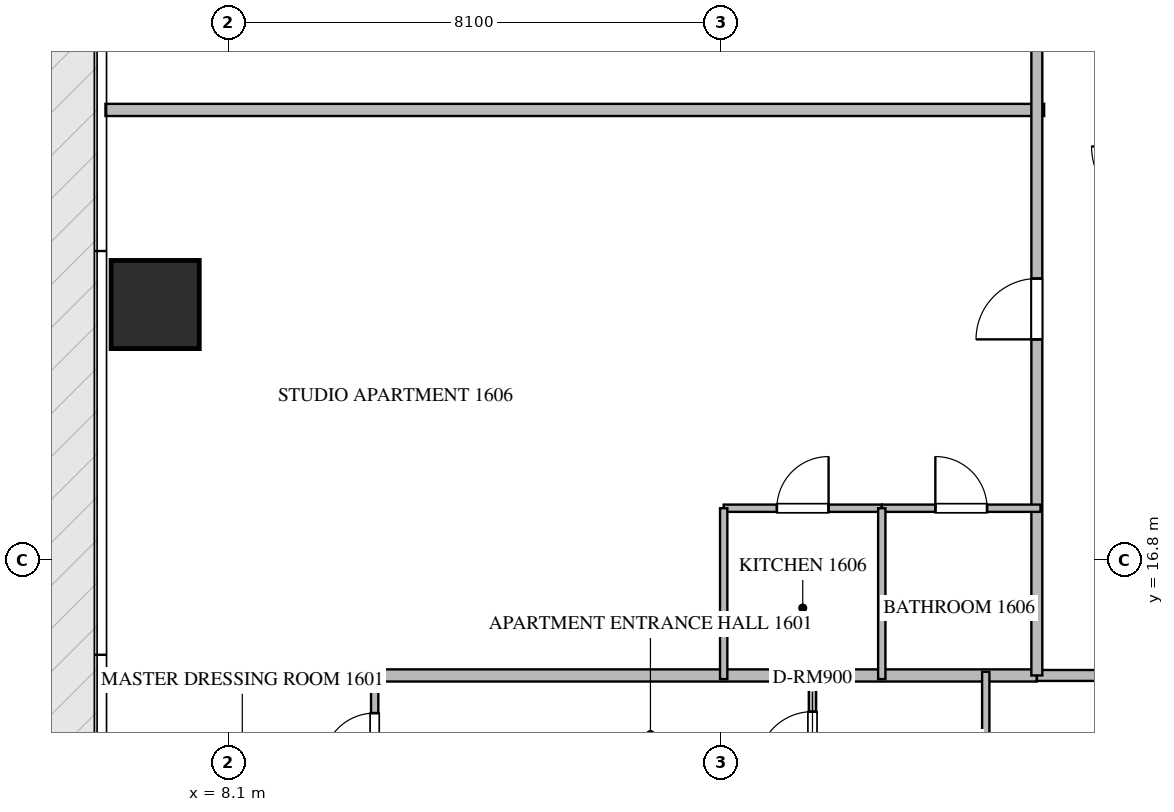
"""IFC4 building model, lengths in metres.
Left out: names, types, materials, properties, quantities, classifications, styles, units other than length and angle.
Written with IfcOpenShell. Run it as: python <this file> out.ifc"""

import sys

from ifc_helpers import new_model, si_unit, direction, frame, frame_2d, origin, origin_2d, place, context, subcontext, project, spatial, rectangle, extrude, source, transform, mapped, element, fill, save


model = new_model("IFC4")
c1 = context("Model", 3, precision=1e-05, world=origin(), true_north=direction((0.0, 1.0)))
c2 = subcontext(c1, "Body", "Model", "MODEL_VIEW")
j1 = project(units=[si_unit("LENGTHUNIT", "METRE"), si_unit("PLANEANGLEUNIT", "RADIAN")], contexts=[c1])
p1 = place(None, origin())
s1 = spatial("IfcSite", under=j1, at=p1, CompositionType="ELEMENT")
p2 = place(p1, origin())
s2 = spatial("IfcBuilding", under=s1, at=p2, CompositionType="ELEMENT")
p3 = place(p2, frame((0.0, 0.0, 67.95)))
s3 = spatial("IfcBuildingStorey", under=s2, at=p3, CompositionType="ELEMENT", Elevation=67.95)
m1 = source(origin(), c2, "Body", "SweptSolid", [
    extrude(rectangle(XDim=1.45, YDim=1.45, at=origin_2d()), origin(), (0.0, 0.0, 1.0), 3.75),
])
p4 = place(p3, frame((6.9, 21.0, -0.26), z_axis=(0.0, 0.0, 1.0), x_axis=(1.0, 0.0, 0.0)))
e1 = element("IfcColumn", 1, at=p4, inside=s3, PredefinedType="COLUMN", context=c2, shape_type="MappedRepresentation", body=[
    mapped(m1, transform((0.0, 0.0, 0.0), scale=1.0)),
])
p5 = place(p3, frame((6.082, 24.2, 0.0), z_axis=(0.0, 0.0, 1.0), x_axis=(1.0, 0.0, 0.0)))
e2 = element("IfcWall", 2, at=p5, inside=s3, PredefinedType="PARTITIONING", context=c2, shape_type="SweptSolid", body=[
    extrude(rectangle(XDim=15.438, YDim=0.2, at=frame_2d((7.719, 0.0))), origin(), (0.0, 0.0, 1.0), 3.49),
])
p6 = place(p3, frame((6.082, 14.9, 0.0), z_axis=(0.0, 0.0, 1.0), x_axis=(1.0, 0.0, 0.0)))
e3 = element("IfcWall", 3, at=p6, inside=s3, PredefinedType="PARTITIONING", context=c2, shape_type="SweptSolid", body=[
    extrude(rectangle(XDim=15.318, YDim=0.2, at=frame_2d((7.659, 0.0))), origin(), (0.0, 0.0, 1.0), 3.49),
])
p7 = place(p3, frame((21.402, 14.9, 0.0), z_axis=(0.0, 0.0, 1.0), x_axis=(1.0, 0.0, 0.0)))
e4 = element("IfcWall", 4, at=p7, inside=s3, PredefinedType="PARTITIONING", context=c2, shape_type="SweptSolid", body=[
    extrude(rectangle(XDim=21.996, YDim=0.18, at=frame_2d((10.998, 0.0))), origin(), (0.0, 0.0, 1.0), 3.49),
])
p8 = place(p7, frame((1.96, 0.0, 0.0)))
e5 = element("IfcOpeningElement", 5, at=p8, cuts=e4, PredefinedType="OPENING", context=c2, shape_type="SweptSolid", body=[
    extrude(rectangle(XDim=1.0, YDim=2.15, at=frame_2d((0.5, 1.075))), frame((0.0, 0.1, 0.0), z_axis=(0.0, -1.0, 0.0), x_axis=(1.0, 0.0, 0.0)), (0.0, 0.0, 1.0), 0.2),
])
p9 = place(p7, frame((5.249, 0.0, 0.0)))
e6 = element("IfcOpeningElement", 6, at=p9, cuts=e4, PredefinedType="OPENING", context=c2, shape_type="SweptSolid", body=[
    extrude(rectangle(XDim=1.0, YDim=2.15, at=frame_2d((0.5, 1.075))), frame((0.0, 0.1, 0.0), z_axis=(0.0, -1.0, 0.0), x_axis=(1.0, 0.0, 0.0)), (0.0, 0.0, 1.0), 0.2),
])
p10 = place(p7, frame((11.653, 0.0, 0.0)))
e7 = element("IfcOpeningElement", 7, at=p10, cuts=e4, PredefinedType="OPENING", context=c2, shape_type="SweptSolid", body=[
    extrude(rectangle(XDim=1.0, YDim=2.15, at=frame_2d((0.5, 1.075))), frame((0.0, 0.1, 0.0), z_axis=(0.0, -1.0, 0.0), x_axis=(1.0, 0.0, 0.0)), (0.0, 0.0, 1.0), 0.2),
])
p11 = place(p7, frame((18.896, 0.0, 0.0)))
e8 = element("IfcOpeningElement", 8, at=p11, cuts=e4, PredefinedType="OPENING", context=c2, shape_type="SweptSolid", body=[
    extrude(rectangle(XDim=1.0, YDim=2.15, at=frame_2d((0.5, 1.075))), frame((0.0, 0.1, 0.0), z_axis=(0.0, -1.0, 0.0), x_axis=(1.0, 0.0, 0.0)), (0.0, 0.0, 1.0), 0.2),
])
p12 = place(p3, frame((21.4, 14.9, 0.0), z_axis=(0.0, 0.0, 1.0), x_axis=(0.0, 1.0, 0.0)))
e9 = element("IfcWall", 9, at=p12, inside=s3, PredefinedType="PARTITIONING", context=c2, shape_type="SweptSolid", body=[
    extrude(rectangle(XDim=20.6, YDim=0.18, at=frame_2d((10.3, 0.0))), origin(), (0.0, 0.0, 1.0), 3.49),
])
p13 = place(p12, frame((5.527, 0.0, 0.0)))
e10 = element("IfcOpeningElement", 10, at=p13, cuts=e9, PredefinedType="OPENING", context=c2, shape_type="SweptSolid", body=[
    extrude(rectangle(XDim=1.0, YDim=2.15, at=frame_2d((0.5, 1.075))), frame((0.0, 0.1, 0.0), z_axis=(0.0, -1.0, 0.0), x_axis=(1.0, 0.0, 0.0)), (0.0, 0.0, 1.0), 0.2),
])
p14 = place(p12, frame((10.604, 0.0, 0.0)))
e11 = element("IfcOpeningElement", 11, at=p14, cuts=e9, PredefinedType="OPENING", context=c2, shape_type="SweptSolid", body=[
    extrude(rectangle(XDim=1.0, YDim=2.15, at=frame_2d((0.5, 1.075))), frame((0.0, 0.1, 0.0), z_axis=(0.0, -1.0, 0.0), x_axis=(1.0, 0.0, 0.0)), (0.0, 0.0, 1.0), 0.2),
])
p15 = place(p3, frame((20.56, 12.15, 0.0), z_axis=(0.0, 0.0, 1.0), x_axis=(0.0, 1.0, 0.0)))
e12 = element("IfcWall", 12, at=p15, inside=s3, PredefinedType="PARTITIONING", context=c2, shape_type="SweptSolid", body=[
    extrude(rectangle(XDim=2.81, YDim=0.12, at=frame_2d((1.405, 0.0))), origin(), (0.0, 0.0, 1.0), 3.49),
])
p16 = place(p3, frame((17.71, 12.75, 0.0), z_axis=(0.0, 0.0, 1.0), x_axis=(0.0, 1.0, 0.0)))
e13 = element("IfcWall", 13, at=p16, inside=s3, PredefinedType="PARTITIONING", context=c2, shape_type="SweptSolid", body=[
    extrude(rectangle(XDim=2.21, YDim=0.12, at=frame_2d((1.105, 0.0))), origin(), (0.0, 0.0, 1.0), 3.49),
])
p17 = place(p16, frame((0.655, 0.0, 0.0)))
e14 = element("IfcOpeningElement", 14, at=p17, cuts=e13, PredefinedType="OPENING", context=c2, shape_type="SweptSolid", body=[
    extrude(rectangle(XDim=0.9, YDim=2.1, at=frame_2d((0.45, 1.05))), frame((0.0, 0.07, 0.0), z_axis=(0.0, -1.0, 0.0), x_axis=(1.0, 0.0, 0.0)), (0.0, 0.0, 1.0), 0.14),
])
p18 = place(p3, frame((10.51, 12.752, 0.0), z_axis=(0.0, 0.0, 1.0), x_axis=(0.0, 1.0, 0.0)))
e15 = element("IfcWall", 15, at=p18, inside=s3, PredefinedType="PARTITIONING", context=c2, shape_type="SweptSolid", body=[
    extrude(rectangle(XDim=2.208, YDim=0.12, at=frame_2d((1.104, 0.0))), origin(), (0.0, 0.0, 1.0), 3.49),
])
p19 = place(p18, frame((0.679, 0.0, 0.0)))
e16 = element("IfcOpeningElement", 16, at=p19, cuts=e15, PredefinedType="OPENING", context=c2, shape_type="SweptSolid", body=[
    extrude(rectangle(XDim=0.85, YDim=2.1, at=frame_2d((0.425, 1.05))), frame((0.0, 0.07, 0.0), z_axis=(0.0, -1.0, 0.0), x_axis=(1.0, 0.0, 0.0)), (0.0, 0.0, 1.0), 0.14),
])
p20 = place(p3, frame((16.25, 17.65, 0.0), z_axis=(0.0, 0.0, 1.0), x_axis=(1.0, 0.0, 0.0)))
e17 = element("IfcWall", 17, at=p20, inside=s3, PredefinedType="PARTITIONING", context=c2, shape_type="SweptSolid", body=[
    extrude(rectangle(XDim=2.6, YDim=0.12, at=frame_2d((1.3, 0.0))), origin(), (0.0, 0.0, 1.0), 3.49),
])
p21 = place(p20, frame((0.875, 0.0, 0.0)))
e18 = element("IfcOpeningElement", 18, at=p21, cuts=e17, PredefinedType="OPENING", context=c2, shape_type="SweptSolid", body=[
    extrude(rectangle(XDim=0.85, YDim=2.1, at=frame_2d((0.425, 1.05))), frame((0.0, 0.07, 0.0), z_axis=(0.0, -1.0, 0.0), x_axis=(1.0, 0.0, 0.0)), (0.0, 0.0, 1.0), 0.14),
])
p22 = place(p3, frame((18.852, 17.65, 0.0), z_axis=(0.0, 0.0, 1.0), x_axis=(1.0, 0.0, 0.0)))
e19 = element("IfcWall", 19, at=p22, inside=s3, PredefinedType="PARTITIONING", context=c2, shape_type="SweptSolid", body=[
    extrude(rectangle(XDim=2.608, YDim=0.12, at=frame_2d((1.304, 0.0))), origin(), (0.0, 0.0, 1.0), 3.49),
])
p23 = place(p22, frame((0.879, 0.0, 0.0)))
e20 = element("IfcOpeningElement", 20, at=p23, cuts=e19, PredefinedType="OPENING", context=c2, shape_type="SweptSolid", body=[
    extrude(rectangle(XDim=0.85, YDim=2.1, at=frame_2d((0.425, 1.05))), frame((0.0, 0.07, 0.0), z_axis=(0.0, -1.0, 0.0), x_axis=(1.0, 0.0, 0.0)), (0.0, 0.0, 1.0), 0.14),
])
for number, where, z_axis, x_axis in (
    (21, (18.85, 14.84, 0.0), (0.0, 0.0, 1.0), (0.0, 1.0, 0.0)),
    (22, (16.25, 14.84, 0.0), (0.0, 0.0, 1.0), (0.0, 1.0, 0.0)),
):
    element("IfcWall", number, at=place(p3, frame(where, z_axis=z_axis, x_axis=x_axis)), inside=s3, PredefinedType="PARTITIONING", context=c2, shape_type="SweptSolid", body=[
        extrude(rectangle(XDim=2.81, YDim=0.12, at=frame_2d((1.405, 0.0))), origin(), (0.0, 0.0, 1.0), 3.49),
    ])
m2 = source(origin(), c2, "Body", "SweptSolid", [
    extrude(rectangle(XDim=1.0, YDim=2.15, at=frame_2d((0.5, 1.075))), frame((0.0, 0.025, 0.0), z_axis=(0.0, -1.0, 0.0), x_axis=(1.0, 0.0, 0.0)), (0.0, 0.0, 1.0), 0.05),
])
p24 = place(p13, origin())
e23 = element("IfcDoor", 23, at=p24, inside=s3, OperationType="SINGLE_SWING_LEFT", PredefinedType="DOOR", context=c2, shape_type="MappedRepresentation", body=[
    mapped(m2, transform((0.0, 0.0, 0.0), scale=1.0)),
])
fill(e10, e23)
m3 = source(origin(), c2, "Body", "SweptSolid", [
    extrude(rectangle(XDim=0.9, YDim=2.1, at=frame_2d((0.45, 1.05))), frame((0.0, 0.025, 0.0), z_axis=(0.0, -1.0, 0.0), x_axis=(1.0, 0.0, 0.0)), (0.0, 0.0, 1.0), 0.05),
])
p25 = place(p17, origin())
e24 = element("IfcDoor", 24, at=p25, inside=s3, OperationType="SINGLE_SWING_LEFT", PredefinedType="DOOR", context=c2, shape_type="MappedRepresentation", body=[
    mapped(m3, transform((0.0, 0.0, 0.0), scale=1.0)),
])
fill(e14, e24)
m4 = source(origin(), c2, "Body", "SweptSolid", [
    extrude(rectangle(XDim=0.85, YDim=2.1, at=frame_2d((0.425, 1.05))), frame((0.0, 0.025, 0.0), z_axis=(0.0, -1.0, 0.0), x_axis=(1.0, 0.0, 0.0)), (0.0, 0.0, 1.0), 0.05),
])
p26 = place(p19, origin())
e25 = element("IfcDoor", 25, at=p26, inside=s3, OperationType="SINGLE_SWING_LEFT", PredefinedType="DOOR", context=c2, shape_type="MappedRepresentation", body=[
    mapped(m4, transform((0.0, 0.0, 0.0), scale=1.0)),
])
fill(e16, e25)
p27 = place(p21, origin())
e26 = element("IfcDoor", 26, at=p27, inside=s3, OperationType="SINGLE_SWING_RIGHT", PredefinedType="DOOR", context=c2, shape_type="MappedRepresentation", body=[
    mapped(m4, transform((0.0, 0.0, 0.0), scale=1.0)),
])
fill(e18, e26)
p28 = place(p23, origin())
e27 = element("IfcDoor", 27, at=p28, inside=s3, OperationType="SINGLE_SWING_LEFT", PredefinedType="DOOR", context=c2, shape_type="MappedRepresentation", body=[
    mapped(m4, transform((0.0, 0.0, 0.0), scale=1.0)),
])
fill(e20, e27)
save(model, sys.argv[1])
